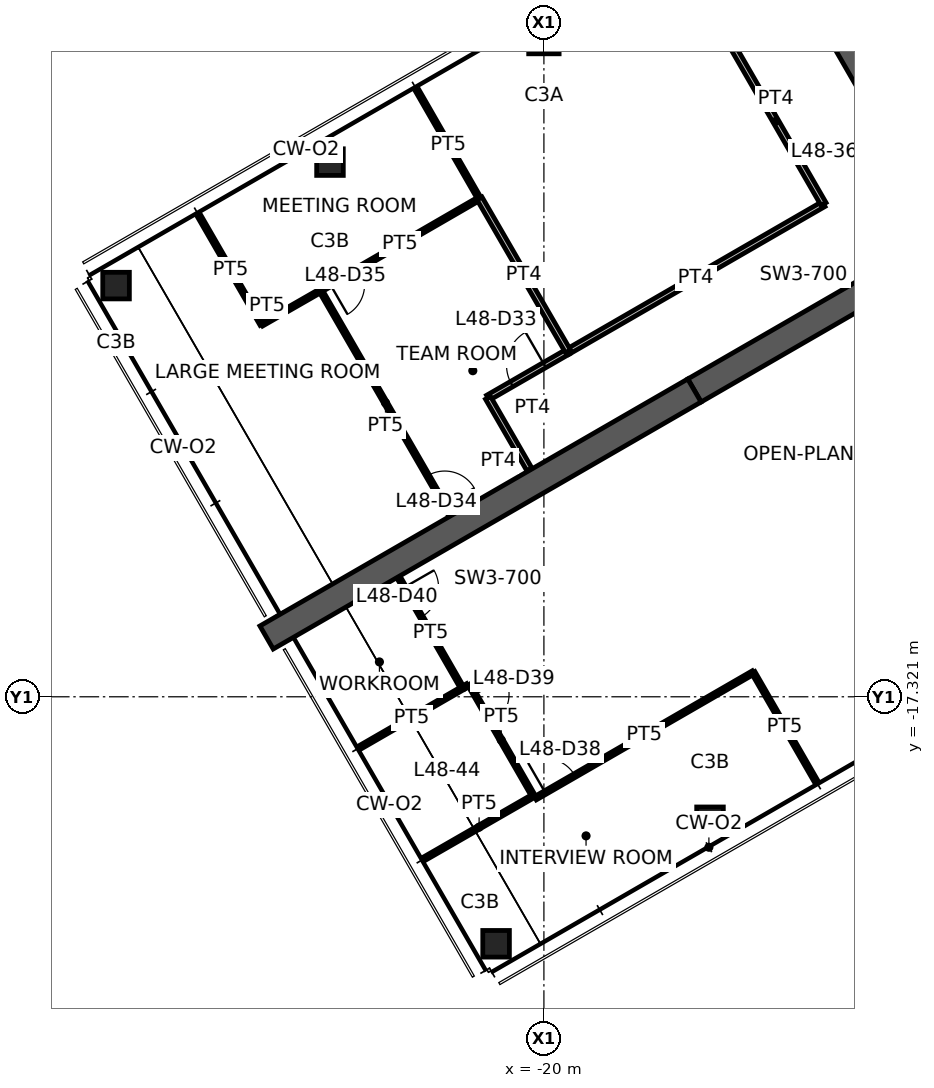
"""IFC4 building model, lengths in metres.
Left out: names, types, materials, properties, quantities, classifications, styles, units other than length and angle.
Written with IfcOpenShell. Run it as: python <this file> out.ifc"""

import sys

from ifc_helpers import new_model, si_unit, direction, frame, frame_2d, origin, origin_2d, place, context, subcontext, project, spatial, polyline, rectangle, hollow_rectangle, outline, extrude, element, fill, save


model = new_model("IFC4")
c1 = context("Model", 3, precision=1e-05, world=origin(), true_north=direction((0.0, 1.0)))
c2 = subcontext(c1, "Body", "Model", "MODEL_VIEW")
j1 = project(units=[si_unit("LENGTHUNIT", "METRE"), si_unit("PLANEANGLEUNIT", "RADIAN")], contexts=[c1])
p1 = place(None, origin())
s1 = spatial("IfcSite", under=j1, at=p1, CompositionType="ELEMENT")
p2 = place(p1, origin())
s2 = spatial("IfcBuilding", under=s1, at=p2, CompositionType="ELEMENT")
p3 = place(p2, frame((0.0, 0.0, 191.6)))
s3 = spatial("IfcBuildingStorey", under=s2, at=p3, CompositionType="ELEMENT", Elevation=191.6)
p4 = place(p3, frame((-20.0, 0.0, 0.0), z_axis=(0.0, 0.0, 1.0), x_axis=(1.0, 0.0, 0.0)))
e1 = element("IfcColumn", 1, at=p4, inside=s3, PredefinedType="COLUMN", context=c2, shape_type="SweptSolid", body=[
    extrude(hollow_rectangle(XDim=0.8, YDim=0.8, WallThickness=0.045, at=origin_2d()), origin(), (0.0, 0.0, 1.0), 3.9),
])
for number, where, z_axis, x_axis in (
    (2, (-25.629, -3.25, 0.0), (0.0, 0.0, 1.0), (1.0, 0.0, 0.0)),
    (3, (-31.258, -6.5, 0.0), (0.0, 0.0, 1.0), (1.0, 0.0, 0.0)),
    (4, (-15.629, -20.571, 0.0), (0.0, 0.0, 1.0), (1.0, 0.0, 0.0)),
    (5, (-21.258, -23.821, 0.0), (0.0, 0.0, 1.0), (1.0, 0.0, 0.0)),
):
    element("IfcColumn", number, at=place(p3, frame(where, z_axis=z_axis, x_axis=x_axis)), inside=s3, PredefinedType="COLUMN", context=c2, shape_type="SweptSolid", body=[
        extrude(hollow_rectangle(XDim=0.7, YDim=0.7, WallThickness=0.036, at=origin_2d()), origin(), (0.0, 0.0, 1.0), 3.9),
    ])
p5 = place(p3, frame((-11.922, 0.0, 0.0), z_axis=(0.0, 0.0, 1.0), x_axis=(0.500004296715, -0.866022923061, 0.0)))
e6 = element("IfcWall", 6, at=p5, inside=s3, PredefinedType="SHEAR", context=c2, shape_type="SweptSolid", body=[
    extrude(outline(polyline([(-0.289, -0.5), (6.331, -0.5), (7.131, -0.5), (12.211, -0.5), (11.634, 0.5), (7.131, 0.5), (6.331, 0.5), (0.289, 0.5), (-0.289, -0.5)])), origin(), (0.0, 0.0, 1.0), 3.9),
])
p6 = place(p5, frame((6.331, 0.0, 0.0)))
e7 = element("IfcOpeningElement", 7, at=p6, cuts=e6, PredefinedType="OPENING", context=c2, shape_type="SweptSolid", body=[
    extrude(rectangle(XDim=0.8, YDim=2.1, at=frame_2d((0.4, 1.05))), frame((0.0, 0.51, 0.0), z_axis=(0.0, -1.0, 0.0), x_axis=(1.0, 0.0, 0.0)), (0.0, 0.0, 1.0), 1.02),
])
p7 = place(p3, frame((-9.375, -5.413, 0.0), z_axis=(0.0, 0.0, 1.0), x_axis=(-0.866032377459, -0.499987921047, 0.0)))
e8 = element("IfcWall", 8, at=p7, inside=s3, PredefinedType="SHEAR", context=c2, shape_type="SweptSolid", body=[
    extrude(rectangle(XDim=7.696, YDim=0.7, at=frame_2d((3.848, 0.0))), origin(), (0.0, 0.0, 1.0), 3.9),
])
p8 = place(p7, frame((0.9, 0.0, 0.0)))
e9 = element("IfcOpeningElement", 9, at=p8, cuts=e8, PredefinedType="OPENING", context=c2, shape_type="SweptSolid", body=[
    extrude(rectangle(XDim=1.0, YDim=2.1, at=frame_2d((0.5, 1.05))), frame((0.0, 0.36, 0.0), z_axis=(0.0, -1.0, 0.0), x_axis=(1.0, 0.0, 0.0)), (0.0, 0.0, 1.0), 0.72),
])
p9 = place(p3, frame((-16.039, -9.26, 0.0), z_axis=(0.0, 0.0, 1.0), x_axis=(-0.866024837091, -0.50000098154, 0.0)))
e10 = element("IfcWall", 10, at=p9, inside=s3, PredefinedType="SHEAR", context=c2, shape_type="SweptSolid", body=[
    extrude(rectangle(XDim=13.0, YDim=0.7, at=frame_2d((6.5, 0.0))), origin(), (0.0, 0.0, 1.0), 3.9),
])
p10 = place(p3, frame((-19.372, -8.24, 0.0), z_axis=(0.0, 0.0, 1.0), x_axis=(0.866015031168, 0.500017965468, 0.0)))
e11 = element("IfcWall", 11, at=p10, inside=s3, PredefinedType="PARTITIONING", context=c2, shape_type="SweptSolid", body=[
    extrude(rectangle(XDim=7.771, YDim=0.15, at=frame_2d((3.886, 0.0))), origin(), (0.0, 0.0, 1.0), 2.95),
])
p11 = place(p3, frame((-12.642, -4.354, 0.0), z_axis=(0.0, 0.0, 1.0), x_axis=(-0.500019495363, 0.866014147839, 0.0)))
e12 = element("IfcWall", 12, at=p11, inside=s3, PredefinedType="PARTITIONING", context=c2, shape_type="SweptSolid", body=[
    extrude(rectangle(XDim=5.028, YDim=0.15, at=frame_2d((2.514, 0.0))), origin(), (0.0, 0.0, 1.0), 2.95),
])
p12 = place(p3, frame((-21.471, -9.452, 0.0), z_axis=(0.0, 0.0, 1.0), x_axis=(0.866025270247, 0.500000231294, 0.0)))
e13 = element("IfcWall", 13, at=p12, inside=s3, PredefinedType="PARTITIONING", context=c2, shape_type="SweptSolid", body=[
    extrude(rectangle(XDim=2.435, YDim=0.15, at=frame_2d((1.217, 0.0))), origin(), (0.0, 0.0, 1.0), 2.95),
])
p13 = place(p12, frame((0.717, 0.0, 0.0)))
e14 = element("IfcOpeningElement", 14, at=p13, cuts=e13, PredefinedType="OPENING", context=c2, shape_type="SweptSolid", body=[
    extrude(rectangle(XDim=1.0, YDim=2.1, at=frame_2d((0.5, 1.05))), frame((0.0, 0.085, 0.0), z_axis=(0.0, -1.0, 0.0), x_axis=(1.0, 0.0, 0.0)), (0.0, 0.0, 1.0), 0.17),
])
p14 = place(p3, frame((-20.381, -11.34, 0.0), z_axis=(0.0, 0.0, 1.0), x_axis=(-0.500029427677, 0.866008413041, 0.0)))
e15 = element("IfcWall", 15, at=p14, inside=s3, PredefinedType="PARTITIONING", context=c2, shape_type="SweptSolid", body=[
    extrude(rectangle(XDim=2.18, YDim=0.15, at=frame_2d((1.09, 0.0))), origin(), (0.0, 0.0, 1.0), 2.95),
])
p15 = place(p3, frame((-29.065, -4.68, 0.0), z_axis=(0.0, 0.0, 1.0), x_axis=(0.500061797536, -0.86598972202, 0.0)))
e16 = element("IfcWall", 16, at=p15, inside=s3, PredefinedType="PARTITIONING", context=c2, shape_type="SweptSolid", body=[
    extrude(rectangle(XDim=3.28, YDim=0.1, at=frame_2d((1.64, 0.0))), origin(), (0.0, 0.0, 1.0), 2.95),
])
p16 = place(p3, frame((-27.425, -7.52, 0.0), z_axis=(0.0, 0.0, 1.0), x_axis=(0.867394737581, 0.497620708188, 0.0)))
e17 = element("IfcWall", 17, at=p16, inside=s3, PredefinedType="PARTITIONING", context=c2, shape_type="SweptSolid", body=[
    extrude(rectangle(XDim=1.791, YDim=0.1, at=frame_2d((0.896, 0.0))), origin(), (0.0, 0.0, 1.0), 2.95),
])
p17 = place(p3, frame((-25.878, -6.627, 0.0), z_axis=(0.0, 0.0, 1.0), x_axis=(0.500502111965, -0.865735315162, 0.0)))
e18 = element("IfcWall", 18, at=p17, inside=s3, PredefinedType="PARTITIONING", context=c2, shape_type="SweptSolid", body=[
    extrude(rectangle(XDim=6.83, YDim=0.1, at=frame_2d((3.415, 0.0))), origin(), (0.0, 0.0, 1.0), 2.95),
])
p18 = place(p17, frame((5.63, 0.0, 0.0)))
e19 = element("IfcOpeningElement", 19, at=p18, cuts=e18, PredefinedType="OPENING", context=c2, shape_type="SweptSolid", body=[
    extrude(rectangle(XDim=0.9, YDim=2.1, at=frame_2d((0.45, 1.05))), frame((0.0, 0.06, 0.0), z_axis=(0.0, -1.0, 0.0), x_axis=(1.0, 0.0, 0.0)), (0.0, 0.0, 1.0), 0.12),
])
p19 = place(p3, frame((-23.332, -1.37, 0.0), z_axis=(0.0, 0.0, 1.0), x_axis=(0.498789948492, -0.866722901095, 0.0)))
e20 = element("IfcWall", 20, at=p19, inside=s3, PredefinedType="PARTITIONING", context=c2, shape_type="SweptSolid", body=[
    extrude(rectangle(XDim=3.28, YDim=0.1, at=frame_2d((1.64, 0.0))), origin(), (0.0, 0.0, 1.0), 2.95),
])
p20 = place(p3, frame((-21.695, -4.206, 0.0), z_axis=(0.0, 0.0, 1.0), x_axis=(-0.865554211136, -0.500815242963, 0.0)))
e21 = element("IfcWall", 21, at=p20, inside=s3, PredefinedType="PARTITIONING", context=c2, shape_type="SweptSolid", body=[
    extrude(rectangle(XDim=4.833, YDim=0.1, at=frame_2d((2.417, 0.0))), origin(), (0.0, 0.0, 1.0), 2.95),
])
p21 = place(p20, frame((3.633, 0.0, 0.0)))
e22 = element("IfcOpeningElement", 22, at=p21, cuts=e21, PredefinedType="OPENING", context=c2, shape_type="SweptSolid", body=[
    extrude(rectangle(XDim=0.9, YDim=2.1, at=frame_2d((0.45, 1.05))), frame((0.0, 0.06, 0.0), z_axis=(0.0, -1.0, 0.0), x_axis=(1.0, 0.0, 0.0)), (0.0, 0.0, 1.0), 0.12),
])
p22 = place(p3, frame((-19.363, -8.234, 0.0), z_axis=(0.0, 0.0, 1.0), x_axis=(-0.500877035324, 0.865518454734, 0.0)))
e23 = element("IfcWall", 23, at=p22, inside=s3, PredefinedType="PARTITIONING", context=c2, shape_type="SweptSolid", body=[
    extrude(rectangle(XDim=4.654, YDim=0.15, at=frame_2d((2.327, 0.0))), origin(), (0.0, 0.0, 1.0), 2.95),
])
p23 = place(p3, frame((-23.137, -21.576, 0.0), z_axis=(0.0, 0.0, 1.0), x_axis=(0.866702770653, 0.498824926544, 0.0)))
e24 = element("IfcWall", 24, at=p23, inside=s3, PredefinedType="PARTITIONING", context=c2, shape_type="SweptSolid", body=[
    extrude(rectangle(XDim=3.306, YDim=0.1, at=frame_2d((1.653, 0.0))), origin(), (0.0, 0.0, 1.0), 2.95),
])
p24 = place(p3, frame((-20.225, -19.991, 0.0), z_axis=(0.0, 0.0, 1.0), x_axis=(0.866030817826, 0.499990622488, 0.0)))
e25 = element("IfcWall", 25, at=p24, inside=s3, PredefinedType="PARTITIONING", context=c2, shape_type="SweptSolid", body=[
    extrude(rectangle(XDim=6.62, YDim=0.1, at=frame_2d((3.31, 0.0))), origin(), (0.0, 0.0, 1.0), 2.95),
])
p25 = place(p24, frame((0.3, 0.0, 0.0)))
e26 = element("IfcOpeningElement", 26, at=p25, cuts=e25, PredefinedType="OPENING", context=c2, shape_type="SweptSolid", body=[
    extrude(rectangle(XDim=0.9, YDim=2.1, at=frame_2d((0.45, 1.05))), frame((0.0, 0.06, 0.0), z_axis=(0.0, -1.0, 0.0), x_axis=(1.0, 0.0, 0.0)), (0.0, 0.0, 1.0), 0.12),
])
p26 = place(p3, frame((-14.492, -16.681, 0.0), z_axis=(0.0, 0.0, 1.0), x_axis=(0.500008057651, -0.866020751647, 0.0)))
e27 = element("IfcWall", 27, at=p26, inside=s3, PredefinedType="PARTITIONING", context=c2, shape_type="SweptSolid", body=[
    extrude(rectangle(XDim=3.305, YDim=0.1, at=frame_2d((1.653, 0.0))), origin(), (0.0, 0.0, 1.0), 2.95),
])
p27 = place(p3, frame((-24.829, -18.646, 0.0), z_axis=(0.0, 0.0, 1.0), x_axis=(0.866002566612, 0.500039553057, 0.0)))
e28 = element("IfcWall", 28, at=p27, inside=s3, PredefinedType="PARTITIONING", context=c2, shape_type="SweptSolid", body=[
    extrude(rectangle(XDim=3.11, YDim=0.1, at=frame_2d((1.555, 0.0))), origin(), (0.0, 0.0, 1.0), 2.95),
])
p28 = place(p3, frame((-21.967, -16.993, 0.0), z_axis=(0.0, 0.0, 1.0), x_axis=(0.498972655929, -0.866617729241, 0.0)))
e29 = element("IfcWall", 29, at=p28, inside=s3, PredefinedType="PARTITIONING", context=c2, shape_type="SweptSolid", body=[
    extrude(rectangle(XDim=3.383, YDim=0.1, at=frame_2d((1.692, 0.0))), origin(), (0.0, 0.0, 1.0), 2.95),
])
p29 = place(p28, frame((0.3, 0.0, 0.0)))
e30 = element("IfcOpeningElement", 30, at=p29, cuts=e29, PredefinedType="OPENING", context=c2, shape_type="SweptSolid", body=[
    extrude(rectangle(XDim=0.9, YDim=2.1, at=frame_2d((0.45, 1.05))), frame((0.0, 0.06, 0.0), z_axis=(0.0, -1.0, 0.0), x_axis=(1.0, 0.0, 0.0)), (0.0, 0.0, 1.0), 0.12),
])
p30 = place(p3, frame((-23.822, -14.181, 0.0), z_axis=(0.0, 0.0, 1.0), x_axis=(0.498880193261, -0.866670959922, 0.0)))
e31 = element("IfcWall", 31, at=p30, inside=s3, PredefinedType="PARTITIONING", context=c2, shape_type="SweptSolid", body=[
    extrude(rectangle(XDim=3.364, YDim=0.1, at=frame_2d((1.682, 0.0))), origin(), (0.0, 0.0, 1.0), 2.95),
])
p31 = place(p30, frame((0.3, 0.0, 0.0)))
e32 = element("IfcOpeningElement", 32, at=p31, cuts=e31, PredefinedType="OPENING", context=c2, shape_type="SweptSolid", body=[
    extrude(rectangle(XDim=0.9, YDim=2.1, at=frame_2d((0.45, 1.05))), frame((0.0, 0.06, 0.0), z_axis=(0.0, -1.0, 0.0), x_axis=(1.0, 0.0, 0.0)), (0.0, 0.0, 1.0), 0.12),
])
p32 = place(p3, frame((-22.01, -17.018, 0.0), z_axis=(0.0, 0.0, 1.0), x_axis=(-0.866224454185, -0.499655075999, 0.0)))
e33 = element("IfcWall", 33, at=p32, inside=s3, PredefinedType="PARTITIONING", context=c2, shape_type="SweptSolid", body=[
    extrude(rectangle(XDim=0.104, YDim=0.1, at=frame_2d((0.052, 0.0))), origin(), (0.0, 0.0, 1.0), 2.95),
])
p33 = place(p13, origin())
e34 = element("IfcDoor", 34, at=p33, inside=s3, OperationType="SINGLE_SWING_RIGHT", PredefinedType="DOOR", context=c2, shape_type="SweptSolid", body=[
    extrude(rectangle(XDim=1.0, YDim=2.1, at=frame_2d((0.5, 1.05))), frame((0.0, 0.025, 0.0), z_axis=(0.0, -1.0, 0.0), x_axis=(1.0, 0.0, 0.0)), (0.0, 0.0, 1.0), 0.05),
])
fill(e14, e34)
p34 = place(p18, origin())
e35 = element("IfcDoor", 35, at=p34, inside=s3, OperationType="SINGLE_SWING_RIGHT", PredefinedType="DOOR", context=c2, shape_type="SweptSolid", body=[
    extrude(rectangle(XDim=0.9, YDim=2.1, at=frame_2d((0.45, 1.05))), frame((0.0, 0.025, 0.0), z_axis=(0.0, -1.0, 0.0), x_axis=(1.0, 0.0, 0.0)), (0.0, 0.0, 1.0), 0.05),
])
fill(e19, e35)
p35 = place(p21, origin())
e36 = element("IfcDoor", 36, at=p35, inside=s3, OperationType="SINGLE_SWING_RIGHT", PredefinedType="DOOR", context=c2, shape_type="SweptSolid", body=[
    extrude(rectangle(XDim=0.9, YDim=2.1, at=frame_2d((0.45, 1.05))), frame((0.0, 0.025, 0.0), z_axis=(0.0, -1.0, 0.0), x_axis=(1.0, 0.0, 0.0)), (0.0, 0.0, 1.0), 0.05),
])
fill(e22, e36)
p36 = place(p25, origin())
e37 = element("IfcDoor", 37, at=p36, inside=s3, OperationType="SINGLE_SWING_LEFT", PredefinedType="DOOR", context=c2, shape_type="SweptSolid", body=[
    extrude(rectangle(XDim=0.9, YDim=2.1, at=frame_2d((0.45, 1.05))), frame((0.0, 0.025, 0.0), z_axis=(0.0, -1.0, 0.0), x_axis=(1.0, 0.0, 0.0)), (0.0, 0.0, 1.0), 0.05),
])
fill(e26, e37)
p37 = place(p29, origin())
e38 = element("IfcDoor", 38, at=p37, inside=s3, OperationType="SINGLE_SWING_LEFT", PredefinedType="DOOR", context=c2, shape_type="SweptSolid", body=[
    extrude(rectangle(XDim=0.9, YDim=2.1, at=frame_2d((0.45, 1.05))), frame((0.0, 0.025, 0.0), z_axis=(0.0, -1.0, 0.0), x_axis=(1.0, 0.0, 0.0)), (0.0, 0.0, 1.0), 0.05),
])
fill(e30, e38)
p38 = place(p31, origin())
e39 = element("IfcDoor", 39, at=p38, inside=s3, OperationType="SINGLE_SWING_LEFT", PredefinedType="DOOR", context=c2, shape_type="SweptSolid", body=[
    extrude(rectangle(XDim=0.9, YDim=2.1, at=frame_2d((0.45, 1.05))), frame((0.0, 0.025, 0.0), z_axis=(0.0, -1.0, 0.0), x_axis=(1.0, 0.0, 0.0)), (0.0, 0.0, 1.0), 0.05),
])
fill(e32, e39)
save(model, sys.argv[1])
